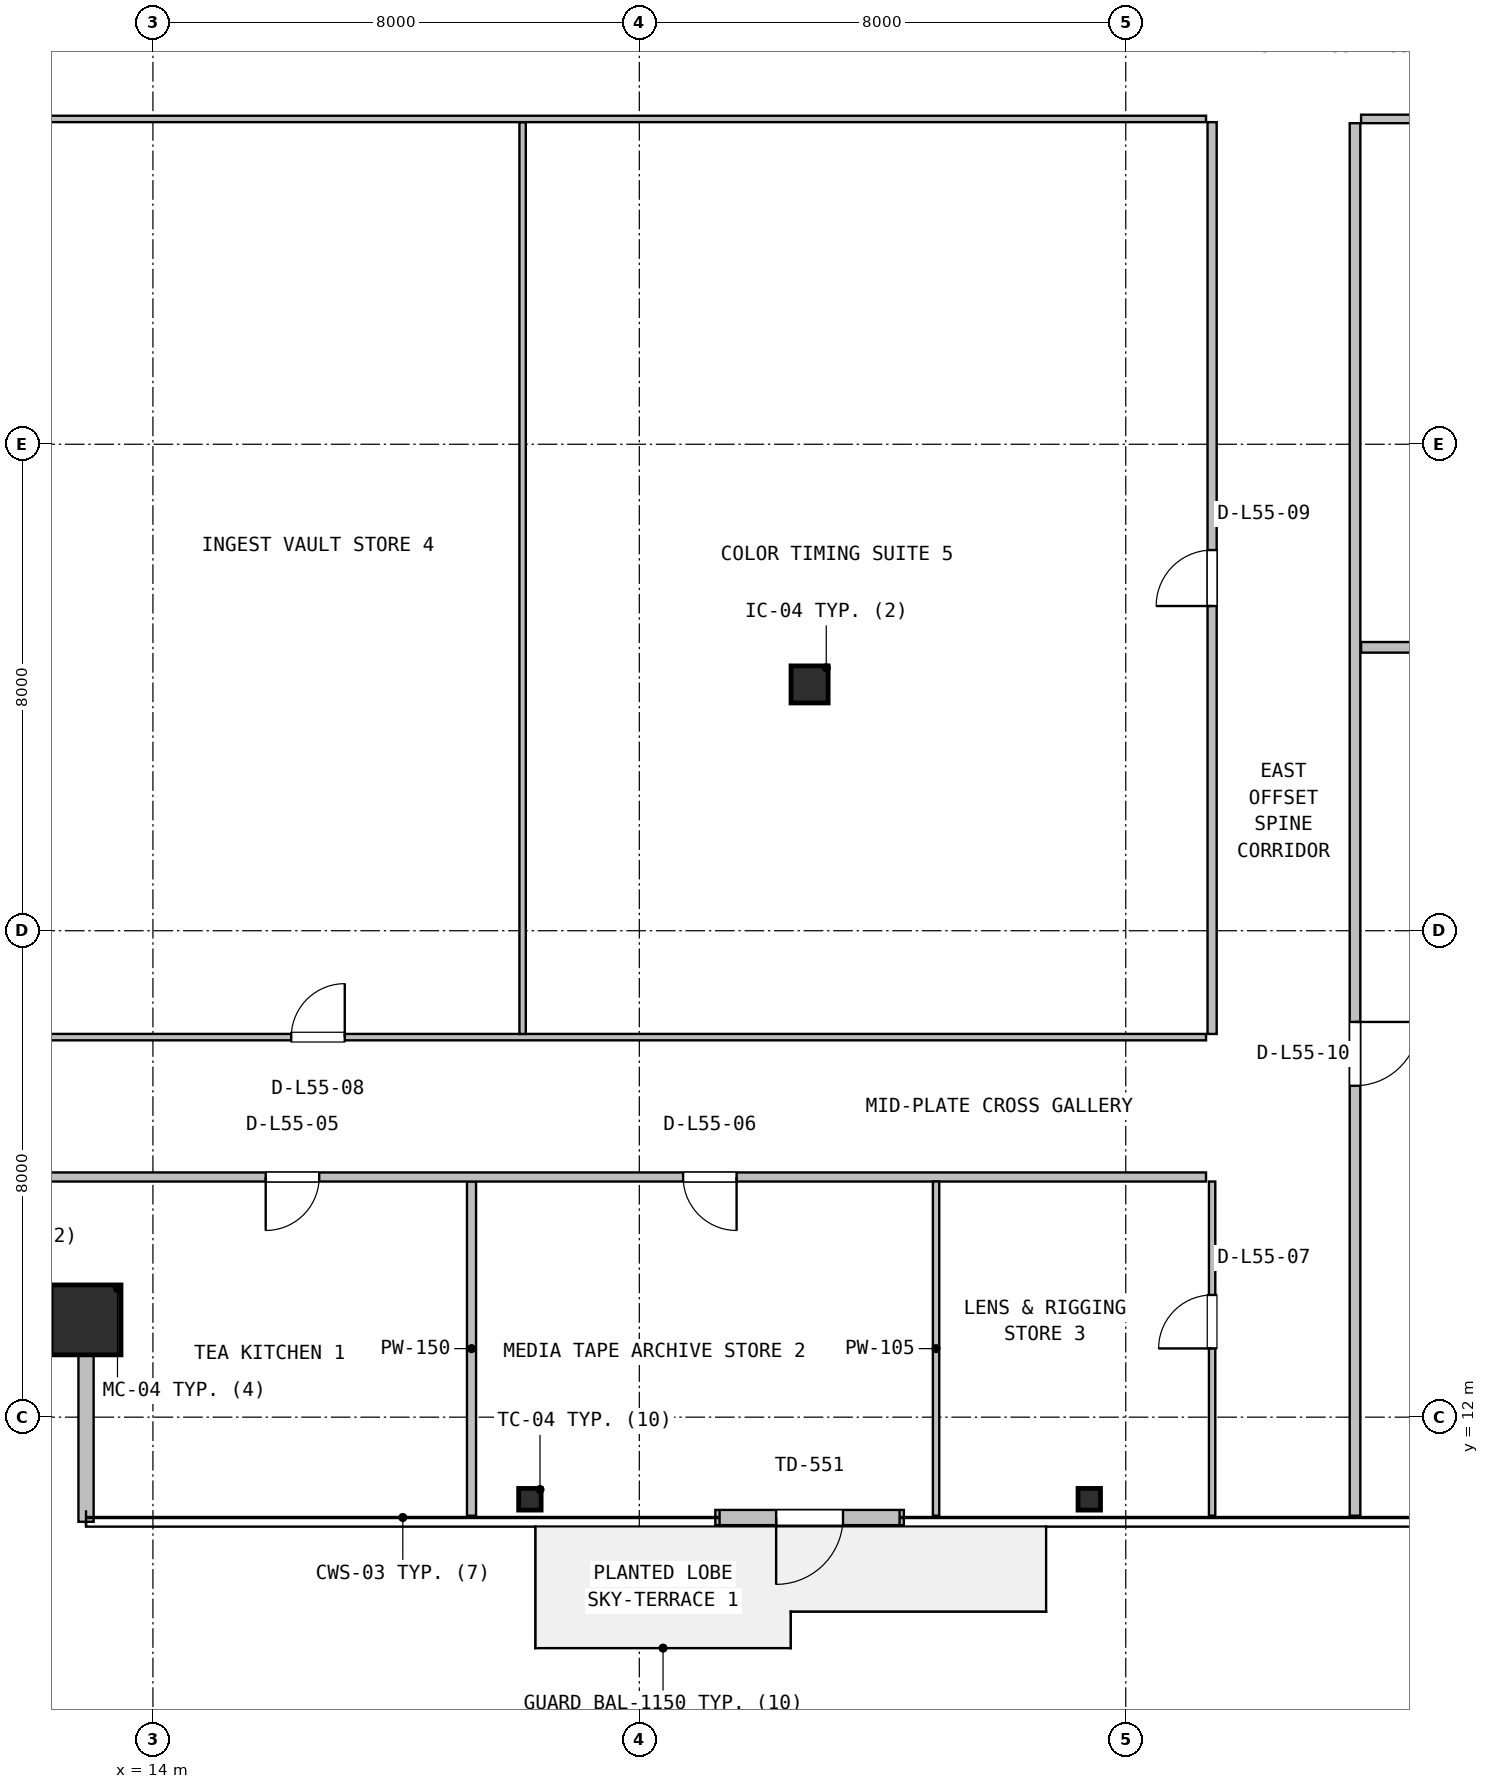
"""IFC4 building model, lengths in metres.
Left out: names, types, materials, properties, quantities, classifications, styles, units other than length and angle.
Written with IfcOpenShell. Run it as: python <this file> out.ifc"""

import sys

from ifc_helpers import new_model, si_unit, direction, frame, frame_2d, origin, origin_2d, place, context, subcontext, project, spatial, rectangle, hollow_rectangle, hollow_circle, i_section, extrude, source, transform, mapped, element, fill, save


model = new_model("IFC4")
c1 = context("Model", 3, precision=1e-05, world=origin(), true_north=direction((0.0, 1.0)))
c2 = subcontext(c1, "Body", "Model", "MODEL_VIEW")
j1 = project(units=[si_unit("LENGTHUNIT", "METRE"), si_unit("PLANEANGLEUNIT", "RADIAN")], contexts=[c1])
p1 = place(None, origin())
s1 = spatial("IfcSite", under=j1, at=p1, CompositionType="ELEMENT")
p2 = place(p1, origin())
s2 = spatial("IfcBuilding", under=s1, at=p2, CompositionType="ELEMENT")
p3 = place(p2, frame((0.0, 0.0, 222.6)))
s3 = spatial("IfcBuildingStorey", under=s2, at=p3, CompositionType="ELEMENT", Elevation=222.6)
m1 = source(origin(), c2, "Body", "SweptSolid", [
    extrude(hollow_rectangle(XDim=1.15, YDim=1.15, WallThickness=0.045, at=origin_2d()), origin(), (0.0, 0.0, 1.0), 3.8),
])
p4 = place(p3, frame((12.9, 13.6, 0.0), z_axis=(0.0, 0.0, 1.0), x_axis=(1.0, 0.0, 0.0)))
e1 = element("IfcColumn", 1, at=p4, inside=s3, PredefinedType="COLUMN", context=c2, shape_type="MappedRepresentation", body=[
    mapped(m1, transform((0.0, 0.0, 0.0), x_axis=(1.0, 0.0, 0.0), y_axis=(0.0, 1.0, 0.0), z_axis=(0.0, 0.0, 1.0), scale=1.0)),
])
m2 = source(origin(), c2, "Body", "SweptSolid", [
    extrude(i_section(OverallWidth=0.369, OverallDepth=0.356, WebThickness=0.011, FlangeThickness=0.018, FilletRadius=0.016, at=origin_2d()), origin(), (0.0, 0.0, 1.0), 3.8),
])
for number, where, z_axis, x_axis in (
    (2, (20.2, 10.65, 0.0), (0.0, 0.0, 1.0), (1.0, 0.0, 0.0)),
    (3, (29.4, 10.65, 0.0), (0.0, 0.0, 1.0), (1.0, 0.0, 0.0)),
):
    element("IfcColumn", number, at=place(p3, frame(where, z_axis=z_axis, x_axis=x_axis)), inside=s3, PredefinedType="COLUMN", context=c2, shape_type="MappedRepresentation", body=[
        mapped(m2, transform((0.0, 0.0, 0.0), x_axis=(1.0, 0.0, 0.0), y_axis=(0.0, 1.0, 0.0), z_axis=(0.0, 0.0, 1.0), scale=1.0)),
    ])
m3 = source(origin(), c2, "Body", "SweptSolid", [
    extrude(hollow_circle(Radius=0.305, WallThickness=0.025, at=origin_2d()), origin(), (0.0, 0.0, 1.0), 3.8),
])
p5 = place(p3, frame((24.8, 24.05, 0.0), z_axis=(0.0, 0.0, 1.0), x_axis=(1.0, 0.0, 0.0)))
e4 = element("IfcColumn", 4, at=p5, inside=s3, PredefinedType="COLUMN", context=c2, shape_type="MappedRepresentation", body=[
    mapped(m3, transform((0.0, 0.0, 0.0), x_axis=(1.0, 0.0, 0.0), y_axis=(0.0, 1.0, 0.0), z_axis=(0.0, 0.0, 1.0), scale=1.0)),
])
p6 = place(p3, frame((23.25, 10.35, 0.0), z_axis=(0.0, 0.0, 1.0), x_axis=(1.0, 0.0, 0.0)))
e5 = element("IfcWall", 5, at=p6, inside=s3, PredefinedType="SOLIDWALL", context=c2, shape_type="SweptSolid", body=[
    extrude(rectangle(XDim=3.1, YDim=0.25, at=frame_2d((1.55, 0.0))), origin(), (0.0, 0.0, 1.0), 3.53),
])
p7 = place(p6, frame((1.0, 0.0, 0.0)))
e6 = element("IfcOpeningElement", 6, at=p7, cuts=e5, PredefinedType="OPENING", context=c2, shape_type="SweptSolid", body=[
    extrude(rectangle(XDim=1.1, YDim=2.15, at=frame_2d((0.55, 1.075))), frame((0.0, 0.135, 0.0), z_axis=(0.0, -1.0, 0.0), x_axis=(1.0, 0.0, 0.0)), (0.0, 0.0, 1.0), 0.27),
])
p8 = place(p3, frame((12.9, 10.28, 0.0), z_axis=(0.0, 0.0, 1.0), x_axis=(0.0, 1.0, 0.0)))
e7 = element("IfcWall", 7, at=p8, inside=s3, PredefinedType="SOLIDWALL", context=c2, shape_type="SweptSolid", body=[
    extrude(rectangle(XDim=3.4, YDim=0.25, at=frame_2d((1.7, 0.0))), origin(), (0.0, 0.0, 1.0), 3.171),
])
p9 = place(p3, frame((19.24, 10.38, 0.0), z_axis=(0.0, 0.0, 1.0), x_axis=(0.0, 1.0, 0.0)))
e8 = element("IfcWall", 8, at=p9, inside=s3, PredefinedType="PARTITIONING", context=c2, shape_type="SweptSolid", body=[
    extrude(rectangle(XDim=5.495, YDim=0.15, at=frame_2d((2.748, 0.0))), origin(), (0.0, 0.0, 1.0), 3.171),
])
p10 = place(p3, frame((9.68, 15.95, 0.0), z_axis=(0.0, 0.0, 1.0), x_axis=(1.0, 0.0, 0.0)))
e9 = element("IfcWall", 9, at=p10, inside=s3, PredefinedType="PARTITIONING", context=c2, shape_type="SweptSolid", body=[
    extrude(rectangle(XDim=21.64, YDim=0.15, at=frame_2d((10.82, 0.0))), origin(), (0.0, 0.0, 1.0), 2.908),
])
p11 = place(p10, frame((6.175, 0.0, 0.0)))
e10 = element("IfcOpeningElement", 10, at=p11, cuts=e9, PredefinedType="OPENING", context=c2, shape_type="SweptSolid", body=[
    extrude(rectangle(XDim=0.88, YDim=2.06, at=frame_2d((0.44, 1.03))), frame((0.0, 0.085, 0.0), z_axis=(0.0, -1.0, 0.0), x_axis=(1.0, 0.0, 0.0)), (0.0, 0.0, 1.0), 0.17),
])
p12 = place(p10, frame((13.04, 0.0, 0.0)))
e11 = element("IfcOpeningElement", 11, at=p12, cuts=e9, PredefinedType="OPENING", context=c2, shape_type="SweptSolid", body=[
    extrude(rectangle(XDim=0.88, YDim=2.06, at=frame_2d((0.44, 1.03))), frame((0.0, 0.085, 0.0), z_axis=(0.0, -1.0, 0.0), x_axis=(1.0, 0.0, 0.0)), (0.0, 0.0, 1.0), 0.17),
])
p13 = place(p3, frame((26.88, 10.38, 0.0), z_axis=(0.0, 0.0, 1.0), x_axis=(0.0, 1.0, 0.0)))
e12 = element("IfcWall", 12, at=p13, inside=s3, PredefinedType="PARTITIONING", context=c2, shape_type="SweptSolid", body=[
    extrude(rectangle(XDim=5.495, YDim=0.105, at=frame_2d((2.748, 0.0))), origin(), (0.0, 0.0, 1.0), 3.171),
])
p14 = place(p3, frame((31.42, 10.38, 0.0), z_axis=(0.0, 0.0, 1.0), x_axis=(0.0, 1.0, 0.0)))
e13 = element("IfcWall", 13, at=p14, inside=s3, PredefinedType="PARTITIONING", context=c2, shape_type="SweptSolid", body=[
    extrude(rectangle(XDim=5.495, YDim=0.105, at=frame_2d((2.748, 0.0))), origin(), (0.0, 0.0, 1.0), 3.171),
])
p15 = place(p14, frame((2.75, 0.0, 0.0)))
e14 = element("IfcOpeningElement", 14, at=p15, cuts=e13, PredefinedType="OPENING", context=c2, shape_type="SweptSolid", body=[
    extrude(rectangle(XDim=0.88, YDim=2.06, at=frame_2d((0.44, 1.03))), frame((0.0, 0.062, 0.0), z_axis=(0.0, -1.0, 0.0), x_axis=(1.0, 0.0, 0.0)), (0.0, 0.0, 1.0), 0.125),
])
p16 = place(p3, frame((9.68, 18.25, 0.0), z_axis=(0.0, 0.0, 1.0), x_axis=(1.0, 0.0, 0.0)))
e15 = element("IfcWall", 15, at=p16, inside=s3, PredefinedType="PARTITIONING", context=c2, shape_type="SweptSolid", body=[
    extrude(rectangle(XDim=21.64, YDim=0.105, at=frame_2d((10.82, 0.0))), origin(), (0.0, 0.0, 1.0), 2.908),
])
p17 = place(p16, frame((6.595, 0.0, 0.0)))
e16 = element("IfcOpeningElement", 16, at=p17, cuts=e15, PredefinedType="OPENING", context=c2, shape_type="SweptSolid", body=[
    extrude(rectangle(XDim=0.88, YDim=2.06, at=frame_2d((0.44, 1.03))), frame((0.0, 0.062, 0.0), z_axis=(0.0, -1.0, 0.0), x_axis=(1.0, 0.0, 0.0)), (0.0, 0.0, 1.0), 0.125),
])
p18 = place(p3, frame((20.08, 18.302, 0.0), z_axis=(0.0, 0.0, 1.0), x_axis=(0.0, 1.0, 0.0)))
e17 = element("IfcWall", 17, at=p18, inside=s3, PredefinedType="PARTITIONING", context=c2, shape_type="SweptSolid", body=[
    extrude(rectangle(XDim=14.995, YDim=0.105, at=frame_2d((7.498, 0.0))), origin(), (0.0, 0.0, 1.0), 3.222),
])
p19 = place(p3, frame((9.68, 33.35, 0.0), z_axis=(0.0, 0.0, 1.0), x_axis=(1.0, 0.0, 0.0)))
e18 = element("IfcWall", 18, at=p19, inside=s3, PredefinedType="PARTITIONING", context=c2, shape_type="SweptSolid", body=[
    extrude(rectangle(XDim=21.64, YDim=0.105, at=frame_2d((10.82, 0.0))), origin(), (0.0, 0.0, 1.0), 2.908),
])
p20 = place(p3, frame((31.42, 18.302, 0.0), z_axis=(0.0, 0.0, 1.0), x_axis=(0.0, 1.0, 0.0)))
e19 = element("IfcWall", 19, at=p20, inside=s3, PredefinedType="PARTITIONING", context=c2, shape_type="SweptSolid", body=[
    extrude(rectangle(XDim=14.995, YDim=0.15, at=frame_2d((7.498, 0.0))), origin(), (0.0, 0.0, 1.0), 2.908),
])
p21 = place(p20, frame((7.038, 0.0, 0.0)))
e20 = element("IfcOpeningElement", 20, at=p21, cuts=e19, PredefinedType="OPENING", context=c2, shape_type="SweptSolid", body=[
    extrude(rectangle(XDim=0.92, YDim=2.08, at=frame_2d((0.46, 1.04))), frame((0.0, 0.085, 0.0), z_axis=(0.0, -1.0, 0.0), x_axis=(1.0, 0.0, 0.0)), (0.0, 0.0, 1.0), 0.17),
])
p22 = place(p3, frame((33.87, 24.66, 0.0), z_axis=(0.0, 0.0, 1.0), x_axis=(1.0, 0.0, 0.0)))
e21 = element("IfcWall", 21, at=p22, inside=s3, PredefinedType="PARTITIONING", context=c2, shape_type="SweptSolid", body=[
    extrude(rectangle(XDim=24.45, YDim=0.175, at=frame_2d((12.225, 0.0))), origin(), (0.0, 0.0, 1.0), 2.908),
])
p23 = place(p3, frame((33.77, 10.38, 0.0), z_axis=(0.0, 0.0, 1.0), x_axis=(0.0, 1.0, 0.0)))
e22 = element("IfcWall", 22, at=p23, inside=s3, PredefinedType="PARTITIONING", context=c2, shape_type="SweptSolid", body=[
    extrude(rectangle(XDim=22.9, YDim=0.175, at=frame_2d((11.45, 0.0))), origin(), (0.0, 0.0, 1.0), 2.908),
])
p24 = place(p23, frame((7.07, 0.0, 0.0)))
e23 = element("IfcOpeningElement", 23, at=p24, cuts=e22, PredefinedType="OPENING", context=c2, shape_type="SweptSolid", body=[
    extrude(rectangle(XDim=1.05, YDim=2.1, at=frame_2d((0.525, 1.05))), frame((0.0, 0.098, 0.0), z_axis=(0.0, -1.0, 0.0), x_axis=(1.0, 0.0, 0.0)), (0.0, 0.0, 1.0), 0.195),
])
p25 = place(p3, frame((33.87, 33.35, 0.0), z_axis=(0.0, 0.0, 1.0), x_axis=(1.0, 0.0, 0.0)))
e24 = element("IfcWall", 24, at=p25, inside=s3, PredefinedType="PARTITIONING", context=c2, shape_type="SweptSolid", body=[
    extrude(rectangle(XDim=24.45, YDim=0.14, at=frame_2d((12.225, 0.0))), origin(), (0.0, 0.0, 1.0), 2.908),
])
p26 = place(p25, frame((9.89, 0.0, 0.0)))
e25 = element("IfcOpeningElement", 25, at=p26, cuts=e24, PredefinedType="OPENING", context=c2, shape_type="SweptSolid", body=[
    extrude(rectangle(XDim=1.0, YDim=2.1, at=frame_2d((0.5, 1.05))), frame((0.0, 0.08, 0.0), z_axis=(0.0, -1.0, 0.0), x_axis=(1.0, 0.0, 0.0)), (0.0, 0.0, 1.0), 0.16),
])
m4 = source(origin(), c2, "Body", "SweptSolid", [
    extrude(rectangle(XDim=1.1, YDim=2.15, at=frame_2d((0.55, 1.075))), frame((0.0, 0.025, 0.0), z_axis=(0.0, -1.0, 0.0), x_axis=(1.0, 0.0, 0.0)), (0.0, 0.0, 1.0), 0.05),
])
p27 = place(p7, frame((1.1, 0.0, 0.0), z_axis=(0.0, 0.0, 1.0), x_axis=(-1.0, 0.0, 0.0)))
e26 = element("IfcDoor", 26, at=p27, inside=s3, OperationType="SINGLE_SWING_LEFT", PredefinedType="DOOR", context=c2, shape_type="MappedRepresentation", body=[
    mapped(m4, transform((0.0, 0.0, 0.0), x_axis=(1.0, 0.0, 0.0), y_axis=(0.0, 1.0, 0.0), z_axis=(0.0, 0.0, 1.0), scale=1.0)),
])
fill(e6, e26)
m5 = source(origin(), c2, "Body", "SweptSolid", [
    extrude(rectangle(XDim=0.88, YDim=2.06, at=frame_2d((0.44, 1.03))), frame((0.0, 0.025, 0.0), z_axis=(0.0, -1.0, 0.0), x_axis=(1.0, 0.0, 0.0)), (0.0, 0.0, 1.0), 0.05),
])
p28 = place(p11, frame((0.88, 0.0, 0.0), z_axis=(0.0, 0.0, 1.0), x_axis=(-1.0, 0.0, 0.0)))
e27 = element("IfcDoor", 27, at=p28, inside=s3, OperationType="SINGLE_SWING_LEFT", PredefinedType="DOOR", context=c2, shape_type="MappedRepresentation", body=[
    mapped(m5, transform((0.0, 0.0, 0.0), x_axis=(1.0, 0.0, 0.0), y_axis=(0.0, 1.0, 0.0), z_axis=(0.0, 0.0, 1.0), scale=1.0)),
])
fill(e10, e27)
p29 = place(p12, frame((0.88, 0.0, 0.0), z_axis=(0.0, 0.0, 1.0), x_axis=(-1.0, 0.0, 0.0)))
e28 = element("IfcDoor", 28, at=p29, inside=s3, OperationType="SINGLE_SWING_RIGHT", PredefinedType="DOOR", context=c2, shape_type="MappedRepresentation", body=[
    mapped(m5, transform((0.0, 0.0, 0.0), x_axis=(1.0, 0.0, 0.0), y_axis=(0.0, 1.0, 0.0), z_axis=(0.0, 0.0, 1.0), scale=1.0)),
])
fill(e11, e28)
p30 = place(p15, origin())
e29 = element("IfcDoor", 29, at=p30, inside=s3, OperationType="SINGLE_SWING_LEFT", PredefinedType="DOOR", context=c2, shape_type="MappedRepresentation", body=[
    mapped(m5, transform((0.0, 0.0, 0.0), x_axis=(1.0, 0.0, 0.0), y_axis=(0.0, 1.0, 0.0), z_axis=(0.0, 0.0, 1.0), scale=1.0)),
])
fill(e14, e29)
p31 = place(p17, origin())
e30 = element("IfcDoor", 30, at=p31, inside=s3, OperationType="SINGLE_SWING_RIGHT", PredefinedType="DOOR", context=c2, shape_type="MappedRepresentation", body=[
    mapped(m5, transform((0.0, 0.0, 0.0), x_axis=(1.0, 0.0, 0.0), y_axis=(0.0, 1.0, 0.0), z_axis=(0.0, 0.0, 1.0), scale=1.0)),
])
fill(e16, e30)
m6 = source(origin(), c2, "Body", "SweptSolid", [
    extrude(rectangle(XDim=0.92, YDim=2.08, at=frame_2d((0.46, 1.04))), frame((0.0, 0.025, 0.0), z_axis=(0.0, -1.0, 0.0), x_axis=(1.0, 0.0, 0.0)), (0.0, 0.0, 1.0), 0.05),
])
p32 = place(p21, origin())
e31 = element("IfcDoor", 31, at=p32, inside=s3, OperationType="SINGLE_SWING_LEFT", PredefinedType="DOOR", context=c2, shape_type="MappedRepresentation", body=[
    mapped(m6, transform((0.0, 0.0, 0.0), x_axis=(1.0, 0.0, 0.0), y_axis=(0.0, 1.0, 0.0), z_axis=(0.0, 0.0, 1.0), scale=1.0)),
])
fill(e20, e31)
m7 = source(origin(), c2, "Body", "SweptSolid", [
    extrude(rectangle(XDim=1.05, YDim=2.1, at=frame_2d((0.525, 1.05))), frame((0.0, 0.025, 0.0), z_axis=(0.0, -1.0, 0.0), x_axis=(1.0, 0.0, 0.0)), (0.0, 0.0, 1.0), 0.05),
])
p33 = place(p24, frame((1.05, 0.0, 0.0), z_axis=(0.0, 0.0, 1.0), x_axis=(-1.0, 0.0, 0.0)))
e32 = element("IfcDoor", 32, at=p33, inside=s3, OperationType="SINGLE_SWING_RIGHT", PredefinedType="DOOR", context=c2, shape_type="MappedRepresentation", body=[
    mapped(m7, transform((0.0, 0.0, 0.0), x_axis=(1.0, 0.0, 0.0), y_axis=(0.0, 1.0, 0.0), z_axis=(0.0, 0.0, 1.0), scale=1.0)),
])
fill(e23, e32)
save(model, sys.argv[1])
